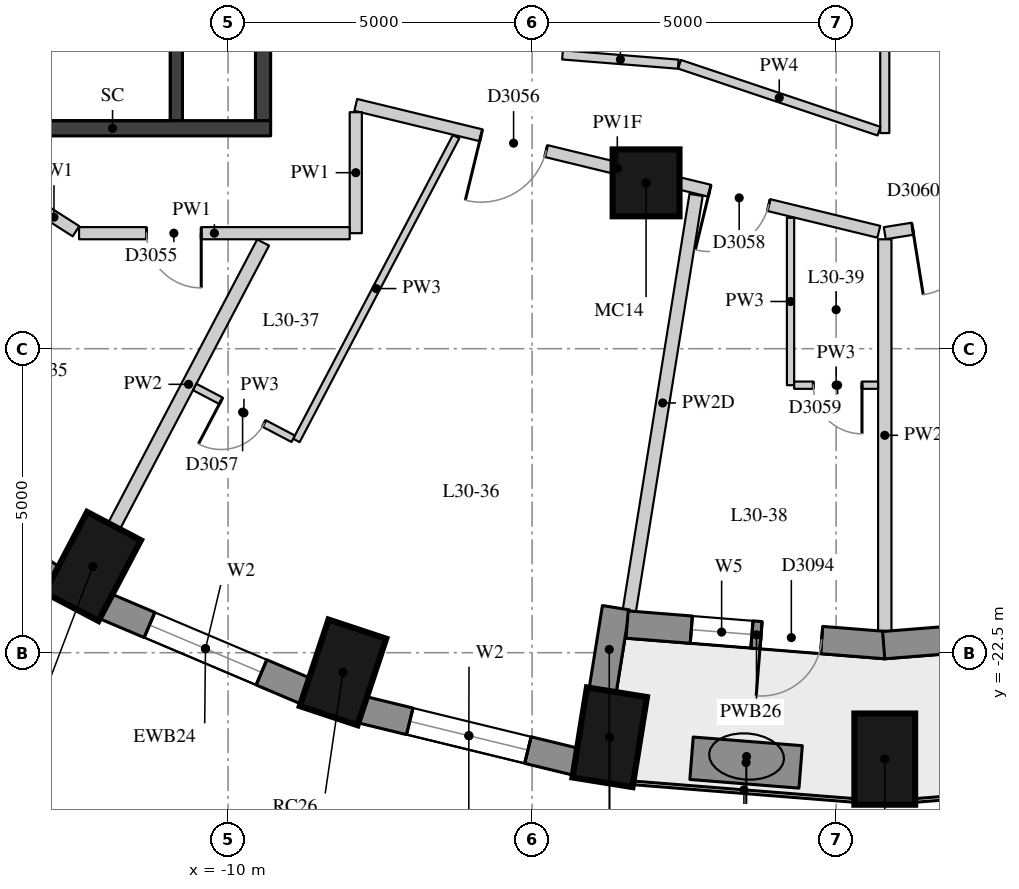
"""IFC4 building model, lengths in metres.
Left out: names, types, materials, properties, quantities, classifications, styles, units other than length and angle.
Written with IfcOpenShell. Run it as: python <this file> out.ifc"""

import sys

from ifc_helpers import new_model, si_unit, direction, frame, frame_2d, origin, origin_2d, place, context, subcontext, project, spatial, rectangle, extrude, element, fill, save


model = new_model("IFC4")
c1 = context("Model", 3, precision=1e-05, world=origin(), true_north=direction((0.0, 1.0)))
c2 = subcontext(c1, "Body", "Model", "MODEL_VIEW")
j1 = project(units=[si_unit("LENGTHUNIT", "METRE"), si_unit("PLANEANGLEUNIT", "RADIAN")], contexts=[c1])
p1 = place(None, origin())
s1 = spatial("IfcSite", under=j1, at=p1, CompositionType="ELEMENT")
p2 = place(p1, origin())
s2 = spatial("IfcBuilding", under=s1, at=p2, CompositionType="ELEMENT")
p3 = place(p2, frame((0.0, 0.0, 108.7)))
s3 = spatial("IfcBuildingStorey", under=s2, at=p3, CompositionType="ELEMENT", Elevation=108.7)
for number, where, z_axis, x_axis in (
    (1, (-12.225, -21.082, 0.0), (0.0, 0.0, 1.0), (-0.465, -0.885, 0.0)),
    (2, (-8.11, -22.824, 0.0), (0.0, 0.0, 1.0), (-0.315, -0.949, 0.0)),
    (3, (-3.724, -23.891, 0.0), (0.0, 0.0, 1.0), (-0.159, -0.987, 0.0)),
    (4, (0.8, -24.25, 0.0), (0.0, 0.0, 1.0), (0.0, -1.0, 0.0)),
):
    element("IfcColumn", number, at=place(p3, frame(where, z_axis=z_axis, x_axis=x_axis)), inside=s3, PredefinedType="COLUMN", context=c2, shape_type="SweptSolid", body=[
        extrude(rectangle(XDim=1.5, YDim=1.0, at=origin_2d()), origin(), (0.0, 0.0, 1.0), 3.3),
    ])
p4 = place(p3, frame((-3.126, -14.772, 0.0), z_axis=(0.0, 0.0, 1.0), x_axis=(1.0, 0.0, 0.0)))
e5 = element("IfcColumn", 5, at=p4, inside=s3, PredefinedType="COLUMN", context=c2, shape_type="SweptSolid", body=[
    extrude(rectangle(XDim=1.1, YDim=1.1, at=origin_2d()), origin(), (0.0, 0.0, 1.0), 3.3),
])
p5 = place(p3, frame((-15.856, -19.392, 0.0), z_axis=(0.0, 0.0, 1.0), x_axis=(0.843891947083, -0.53651317006, 0.0)))
e6 = element("IfcWall", 6, at=p5, inside=s3, PredefinedType="SOLIDWALL", context=c2, shape_type="SweptSolid", body=[
    extrude(rectangle(XDim=3.532, YDim=0.45, at=frame_2d((1.766, 0.0))), origin(), (0.0, 0.0, 1.0), 3.02),
])
p6 = place(p5, frame((0.766, 0.0, 0.4)))
e7 = element("IfcOpeningElement", 7, at=p6, cuts=e6, PredefinedType="OPENING", context=c2, shape_type="SweptSolid", body=[
    extrude(rectangle(XDim=2.0, YDim=1.75, at=frame_2d((1.0, 0.875))), frame((0.0, 0.235, 0.0), z_axis=(0.0, -1.0, 0.0), x_axis=(1.0, 0.0, 0.0)), (0.0, 0.0, 1.0), 0.47),
])
p7 = place(p3, frame((-12.025, -21.733, 0.0), z_axis=(0.0, 0.0, 1.0), x_axis=(0.920879975612, -0.389846213932, 0.0)))
e8 = element("IfcWall", 8, at=p7, inside=s3, PredefinedType="SOLIDWALL", context=c2, shape_type="SweptSolid", body=[
    extrude(rectangle(XDim=3.592, YDim=0.45, at=frame_2d((1.796, 0.0))), origin(), (0.0, 0.0, 1.0), 3.02),
])
p8 = place(p7, frame((0.796, 0.0, 0.4)))
e9 = element("IfcOpeningElement", 9, at=p8, cuts=e8, PredefinedType="OPENING", context=c2, shape_type="SweptSolid", body=[
    extrude(rectangle(XDim=2.0, YDim=1.75, at=frame_2d((1.0, 0.875))), frame((0.0, 0.235, 0.0), z_axis=(0.0, -1.0, 0.0), x_axis=(1.0, 0.0, 0.0)), (0.0, 0.0, 1.0), 0.47),
])
p9 = place(p3, frame((-7.807, -23.435, 0.0), z_axis=(0.0, 0.0, 1.0), x_axis=(0.971667603162, -0.236351579148, 0.0)))
e10 = element("IfcWall", 10, at=p9, inside=s3, PredefinedType="SOLIDWALL", context=c2, shape_type="SweptSolid", body=[
    extrude(rectangle(XDim=3.635, YDim=0.45, at=frame_2d((1.817, 0.0))), origin(), (0.0, 0.0, 1.0), 3.02),
])
p10 = place(p9, frame((0.817, 0.0, 0.4)))
e11 = element("IfcOpeningElement", 11, at=p10, cuts=e10, PredefinedType="OPENING", context=c2, shape_type="SweptSolid", body=[
    extrude(rectangle(XDim=2.0, YDim=1.75, at=frame_2d((1.0, 0.875))), frame((0.0, 0.235, 0.0), z_axis=(0.0, -1.0, 0.0), x_axis=(1.0, 0.0, 0.0)), (0.0, 0.0, 1.0), 0.47),
])
p11 = place(p3, frame((-3.841, -23.132, 0.0), z_axis=(0.0, 0.0, 1.0), x_axis=(0.158442643832, 0.987368182906, 0.0)))
e12 = element("IfcWall", 12, at=p11, inside=s3, PredefinedType="SOLIDWALL", context=c2, shape_type="SweptSolid", body=[
    extrude(rectangle(XDim=1.39, YDim=0.45, at=frame_2d((0.695, 0.0))), origin(), (0.0, 0.0, 1.0), 2.47),
])
p12 = place(p3, frame((-3.438, -22.037, 0.0), z_axis=(0.0, 0.0, 1.0), x_axis=(0.996844307919, -0.079381520332, 0.0)))
e13 = element("IfcWall", 13, at=p12, inside=s3, PredefinedType="SOLIDWALL", context=c2, shape_type="SweptSolid", body=[
    extrude(rectangle(XDim=4.269, YDim=0.45, at=frame_2d((2.134, 0.0))), origin(), (0.0, 0.0, 1.0), 3.02),
])
p13 = place(p12, frame((1.06, 0.0, 0.4)))
e14 = element("IfcOpeningElement", 14, at=p13, cuts=e13, PredefinedType="OPENING", context=c2, shape_type="SweptSolid", body=[
    extrude(rectangle(XDim=1.0, YDim=1.75, at=frame_2d((0.5, 0.875))), frame((0.0, 0.235, 0.0), z_axis=(0.0, -1.0, 0.0), x_axis=(1.0, 0.0, 0.0)), (0.0, 0.0, 1.0), 0.47),
])
p14 = place(p12, frame((2.209, 0.0, 0.0)))
e15 = element("IfcOpeningElement", 15, at=p14, cuts=e13, PredefinedType="OPENING", context=c2, shape_type="SweptSolid", body=[
    extrude(rectangle(XDim=1.0, YDim=2.15, at=frame_2d((0.5, 1.075))), frame((0.0, 0.235, 0.0), z_axis=(0.0, -1.0, 0.0), x_axis=(1.0, 0.0, 0.0)), (0.0, 0.0, 1.0), 0.47),
])
p15 = place(p3, frame((0.782, -22.376, 0.0), z_axis=(0.0, 0.0, 1.0), x_axis=(0.996843465986, 0.079392092303, 0.0)))
e16 = element("IfcWall", 16, at=p15, inside=s3, PredefinedType="SOLIDWALL", context=c2, shape_type="SweptSolid", body=[
    extrude(rectangle(XDim=4.287, YDim=0.45, at=frame_2d((2.143, 0.0))), origin(), (0.0, 0.0, 1.0), 3.02),
])
p16 = place(p15, frame((1.068, 0.0, 0.4)))
e17 = element("IfcOpeningElement", 17, at=p16, cuts=e16, PredefinedType="OPENING", context=c2, shape_type="SweptSolid", body=[
    extrude(rectangle(XDim=1.0, YDim=1.75, at=frame_2d((0.5, 0.875))), frame((0.0, 0.235, 0.0), z_axis=(0.0, -1.0, 0.0), x_axis=(1.0, 0.0, 0.0)), (0.0, 0.0, 1.0), 0.47),
])
p17 = place(p15, frame((2.219, 0.0, 0.0)))
e18 = element("IfcOpeningElement", 18, at=p17, cuts=e16, PredefinedType="OPENING", context=c2, shape_type="SweptSolid", body=[
    extrude(rectangle(XDim=1.0, YDim=2.15, at=frame_2d((0.5, 1.075))), frame((0.0, 0.235, 0.0), z_axis=(0.0, -1.0, 0.0), x_axis=(1.0, 0.0, 0.0)), (0.0, 0.0, 1.0), 0.47),
])
p18 = place(p3, frame((-2.378, -24.236, 0.0), z_axis=(0.0, 0.0, 1.0), x_axis=(0.996858257414, -0.079206152698, 0.0)))
e19 = element("IfcWall", 19, at=p18, inside=s3, PredefinedType="USERDEFINED", context=c2, shape_type="SweptSolid", body=[
    extrude(rectangle(XDim=1.8, YDim=0.7, at=frame_2d((0.9, 0.0))), origin(), (0.0, 0.0, 1.0), 0.75),
])
p19 = place(p3, frame((-10.85, -13.75, 0.0), z_axis=(0.0, 0.0, 1.0), x_axis=(0.0, 1.0, 0.0)))
e20 = element("IfcWall", 20, at=p19, inside=s3, PredefinedType="SHEAR", context=c2, shape_type="SweptSolid", body=[
    extrude(rectangle(XDim=6.0, YDim=0.2, at=frame_2d((3.0, 0.0))), origin(), (0.0, 0.0, 1.0), 3.02),
])
p20 = place(p19, frame((4.4, 0.0, 0.0)))
e21 = element("IfcOpeningElement", 21, at=p20, cuts=e20, PredefinedType="OPENING", context=c2, shape_type="SweptSolid", body=[
    extrude(rectangle(XDim=1.5, YDim=2.1, at=frame_2d((0.75, 1.05))), frame((0.0, 0.11, 0.0), z_axis=(0.0, -1.0, 0.0), x_axis=(1.0, 0.0, 0.0)), (0.0, 0.0, 1.0), 0.22),
])
p21 = place(p3, frame((-9.425, -13.75, -0.28), z_axis=(0.0, 0.0, 1.0), x_axis=(0.0, 1.0, 0.0)))
e22 = element("IfcWall", 22, at=p21, inside=s3, PredefinedType="SHEAR", context=c2, shape_type="SweptSolid", body=[
    extrude(rectangle(XDim=6.0, YDim=0.25, at=frame_2d((3.0, 0.0))), origin(), (0.0, 0.0, 1.0), 3.3),
])
p22 = place(p21, frame((2.4, 0.0, 0.28)))
e23 = element("IfcOpeningElement", 23, at=p22, cuts=e22, PredefinedType="OPENING", context=c2, shape_type="SweptSolid", body=[
    extrude(rectangle(XDim=1.5, YDim=2.1, at=frame_2d((0.75, 1.05))), frame((0.0, 0.135, 0.0), z_axis=(0.0, -1.0, 0.0), x_axis=(1.0, 0.0, 0.0)), (0.0, 0.0, 1.0), 0.27),
])
p23 = place(p3, frame((-14.5, -13.875, -0.28), z_axis=(0.0, 0.0, 1.0), x_axis=(1.0, 0.0, 0.0)))
e24 = element("IfcWall", 24, at=p23, inside=s3, PredefinedType="SHEAR", context=c2, shape_type="SweptSolid", body=[
    extrude(rectangle(XDim=5.2, YDim=0.25, at=frame_2d((2.6, 0.0))), origin(), (0.0, 0.0, 1.0), 3.3),
])
p24 = place(p3, frame((6.891, -14.625, 0.0), z_axis=(0.0, 0.0, 1.0), x_axis=(-0.987419134366, -0.158124802253, 0.0)))
e25 = element("IfcWall", 25, at=p24, inside=s3, PredefinedType="PARTITIONING", context=c2, shape_type="SweptSolid", body=[
    extrude(rectangle(XDim=6.168, YDim=0.2, at=frame_2d((3.084, 0.0))), origin(), (0.0, 0.0, 1.0), 2.42),
])
p25 = place(p24, frame((4.604, 0.0, 0.0)))
e26 = element("IfcOpeningElement", 26, at=p25, cuts=e25, PredefinedType="OPENING", context=c2, shape_type="SweptSolid", body=[
    extrude(rectangle(XDim=1.1, YDim=2.1, at=frame_2d((0.55, 1.05))), frame((0.0, 0.11, 0.0), z_axis=(0.0, -1.0, 0.0), x_axis=(1.0, 0.0, 0.0)), (0.0, 0.0, 1.0), 0.22),
])
p26 = place(p3, frame((0.702, -15.577, 0.0), z_axis=(0.0, 0.0, 1.0), x_axis=(-0.971804733873, 0.235787105715, 0.0)))
e27 = element("IfcWall", 27, at=p26, inside=s3, PredefinedType="PARTITIONING", context=c2, shape_type="SweptSolid", body=[
    extrude(rectangle(XDim=8.852, YDim=0.2, at=frame_2d((4.426, 0.0))), origin(), (0.0, 0.0, 1.0), 2.42),
])
p27 = place(p26, frame((5.631, 0.0, 0.0)))
e28 = element("IfcOpeningElement", 28, at=p27, cuts=e27, PredefinedType="OPENING", context=c2, shape_type="SweptSolid", body=[
    extrude(rectangle(XDim=1.1, YDim=2.1, at=frame_2d((0.55, 1.05))), frame((0.0, 0.11, 0.0), z_axis=(0.0, -1.0, 0.0), x_axis=(1.0, 0.0, 0.0)), (0.0, 0.0, 1.0), 0.22),
])
p28 = place(p26, frame((1.863, 0.0, 0.0)))
e29 = element("IfcOpeningElement", 29, at=p28, cuts=e27, PredefinedType="OPENING", context=c2, shape_type="SweptSolid", body=[
    extrude(rectangle(XDim=1.0, YDim=2.1, at=frame_2d((0.5, 1.05))), frame((0.0, 0.11, 0.0), z_axis=(0.0, -1.0, 0.0), x_axis=(1.0, 0.0, 0.0)), (0.0, 0.0, 1.0), 0.22),
])
p29 = place(p3, frame((-7.9, -13.61, 0.0), z_axis=(0.0, 0.0, 1.0), x_axis=(0.0, -1.0, 0.0)))
e30 = element("IfcWall", 30, at=p29, inside=s3, PredefinedType="PARTITIONING", context=c2, shape_type="SweptSolid", body=[
    extrude(rectangle(XDim=1.99, YDim=0.2, at=frame_2d((0.995, 0.0))), origin(), (0.0, 0.0, 1.0), 3.02),
])
p30 = place(p3, frame((-8.0, -15.6, 0.0), z_axis=(0.0, 0.0, 1.0), x_axis=(-1.0, 0.0, 0.0)))
e31 = element("IfcWall", 31, at=p30, inside=s3, PredefinedType="PARTITIONING", context=c2, shape_type="SweptSolid", body=[
    extrude(rectangle(XDim=4.451, YDim=0.2, at=frame_2d((2.226, 0.0))), origin(), (0.0, 0.0, 1.0), 3.02),
])
p31 = place(p30, frame((2.442, 0.0, 0.0)))
e32 = element("IfcOpeningElement", 32, at=p31, cuts=e31, PredefinedType="OPENING", context=c2, shape_type="SweptSolid", body=[
    extrude(rectangle(XDim=0.9, YDim=2.1, at=frame_2d((0.45, 1.05))), frame((0.0, 0.11, 0.0), z_axis=(0.0, -1.0, 0.0), x_axis=(1.0, 0.0, 0.0)), (0.0, 0.0, 1.0), 0.22),
])
p32 = place(p3, frame((-12.501, -15.568, 0.0), z_axis=(0.0, 0.0, 1.0), x_axis=(-0.843169167706, 0.537648355926, 0.0)))
e33 = element("IfcWall", 33, at=p32, inside=s3, PredefinedType="PARTITIONING", context=c2, shape_type="SweptSolid", body=[
    extrude(rectangle(XDim=0.858, YDim=0.2, at=frame_2d((0.429, 0.0))), origin(), (0.0, 0.0, 1.0), 3.02),
])
p33 = place(p3, frame((0.8, -9.23, 0.0), z_axis=(0.0, 0.0, 1.0), x_axis=(0.0, -1.0, 0.0)))
e34 = element("IfcWall", 34, at=p33, inside=s3, PredefinedType="PARTITIONING", context=c2, shape_type="SweptSolid", body=[
    extrude(rectangle(XDim=4.724, YDim=0.15, at=frame_2d((2.362, 0.0))), origin(), (0.0, 0.0, 1.0), 3.02),
])
p34 = place(p33, frame((1.912, 0.0, 0.0)))
e35 = element("IfcOpeningElement", 35, at=p34, cuts=e34, PredefinedType="OPENING", context=c2, shape_type="SweptSolid", body=[
    extrude(rectangle(XDim=0.9, YDim=2.1, at=frame_2d((0.45, 1.05))), frame((0.0, 0.085, 0.0), z_axis=(0.0, -1.0, 0.0), x_axis=(1.0, 0.0, 0.0)), (0.0, 0.0, 1.0), 0.17),
])
p35 = place(p3, frame((0.705, -13.922, 0.0), z_axis=(0.0, 0.0, 1.0), x_axis=(-0.948131483463, 0.317878420258, 0.0)))
e36 = element("IfcWall", 36, at=p35, inside=s3, PredefinedType="PARTITIONING", context=c2, shape_type="SweptSolid", body=[
    extrude(rectangle(XDim=3.46, YDim=0.15, at=frame_2d((1.73, 0.0))), origin(), (0.0, 0.0, 1.0), 3.02),
])
p36 = place(p3, frame((-2.596, -12.82, 0.0), z_axis=(0.0, 0.0, 1.0), x_axis=(-0.996815278536, 0.079745222283, 0.0)))
e37 = element("IfcWall", 37, at=p36, inside=s3, PredefinedType="PARTITIONING", context=c2, shape_type="SweptSolid", body=[
    extrude(rectangle(XDim=1.91, YDim=0.15, at=frame_2d((0.955, 0.0))), origin(), (0.0, 0.0, 1.0), 3.02),
])
p37 = place(p3, frame((-11.876, -20.418, 0.0), z_axis=(0.0, 0.0, 1.0), x_axis=(0.465320539057, 0.885142246157, 0.0)))
e38 = element("IfcWall", 38, at=p37, inside=s3, PredefinedType="PARTITIONING", context=c2, shape_type="SweptSolid", body=[
    extrude(rectangle(XDim=5.269, YDim=0.22, at=frame_2d((2.635, 0.0))), origin(), (0.0, 0.0, 1.0), 3.02),
])
p38 = place(p3, frame((-3.402, -21.814, 0.0), z_axis=(0.0, 0.0, 1.0), x_axis=(0.158512534522, 0.987356965033, 0.0)))
e39 = element("IfcWall", 39, at=p38, inside=s3, PredefinedType="PARTITIONING", context=c2, shape_type="SweptSolid", body=[
    extrude(rectangle(XDim=6.931, YDim=0.22, at=frame_2d((3.465, 0.0))), origin(), (0.0, 0.0, 1.0), 2.47),
])
p39 = place(p3, frame((0.8, -22.149, 0.0), z_axis=(0.0, 0.0, 1.0), x_axis=(0.0, 1.0, 0.0)))
e40 = element("IfcWall", 40, at=p39, inside=s3, PredefinedType="PARTITIONING", context=c2, shape_type="SweptSolid", body=[
    extrude(rectangle(XDim=6.448, YDim=0.22, at=frame_2d((3.224, 0.0))), origin(), (0.0, 0.0, 1.0), 2.47),
])
p40 = place(p3, frame((-6.25, -14.013, 0.0), z_axis=(0.0, 0.0, 1.0), x_axis=(-0.465288210927, -0.885159240347, 0.0)))
e41 = element("IfcWall", 41, at=p40, inside=s3, PredefinedType="PARTITIONING", context=c2, shape_type="SweptSolid", body=[
    extrude(rectangle(XDim=5.644, YDim=0.12, at=frame_2d((2.822, 0.0))), origin(), (0.0, 0.0, 1.0), 3.02),
])
p41 = place(p3, frame((-0.75, -15.347, 0.0), z_axis=(0.0, 0.0, 1.0), x_axis=(0.0, -1.0, 0.0)))
e42 = element("IfcWall", 42, at=p41, inside=s3, PredefinedType="PARTITIONING", context=c2, shape_type="SweptSolid", body=[
    extrude(rectangle(XDim=2.753, YDim=0.12, at=frame_2d((1.376, 0.0))), origin(), (0.0, 0.0, 1.0), 3.02),
])
p42 = place(p3, frame((-8.929, -18.981, 0.0), z_axis=(0.0, 0.0, 1.0), x_axis=(-0.885114946598, 0.465372465139, 0.0)))
e43 = element("IfcWall", 43, at=p42, inside=s3, PredefinedType="PARTITIONING", context=c2, shape_type="SweptSolid", body=[
    extrude(rectangle(XDim=1.83, YDim=0.12, at=frame_2d((0.915, 0.0))), origin(), (0.0, 0.0, 1.0), 3.02),
])
p43 = place(p42, frame((0.54, 0.0, 0.0)))
e44 = element("IfcOpeningElement", 44, at=p43, cuts=e43, PredefinedType="OPENING", context=c2, shape_type="SweptSolid", body=[
    extrude(rectangle(XDim=0.8, YDim=2.1, at=frame_2d((0.4, 1.05))), frame((0.0, 0.07, 0.0), z_axis=(0.0, -1.0, 0.0), x_axis=(1.0, 0.0, 0.0)), (0.0, 0.0, 1.0), 0.14),
])
p44 = place(p3, frame((-0.69, -18.1, 0.0), z_axis=(0.0, 0.0, 1.0), x_axis=(1.0, 0.0, 0.0)))
e45 = element("IfcWall", 45, at=p44, inside=s3, PredefinedType="PARTITIONING", context=c2, shape_type="SweptSolid", body=[
    extrude(rectangle(XDim=1.38, YDim=0.12, at=frame_2d((0.69, 0.0))), origin(), (0.0, 0.0, 1.0), 3.02),
])
p45 = place(p44, frame((0.315, 0.0, 0.0)))
e46 = element("IfcOpeningElement", 46, at=p45, cuts=e45, PredefinedType="OPENING", context=c2, shape_type="SweptSolid", body=[
    extrude(rectangle(XDim=0.8, YDim=2.1, at=frame_2d((0.4, 1.05))), frame((0.0, 0.07, 0.0), z_axis=(0.0, -1.0, 0.0), x_axis=(1.0, 0.0, 0.0)), (0.0, 0.0, 1.0), 0.14),
])
p46 = place(p8, origin())
e47 = element("IfcWindow", 47, at=p46, inside=s3, PartitioningType="SINGLE_PANEL", PredefinedType="WINDOW", context=c2, shape_type="SweptSolid", body=[
    extrude(rectangle(XDim=2.0, YDim=1.75, at=frame_2d((1.0, 0.875))), frame((0.0, 0.035, 0.0), z_axis=(0.0, -1.0, 0.0), x_axis=(1.0, 0.0, 0.0)), (0.0, 0.0, 1.0), 0.06),
])
fill(e9, e47)
p47 = place(p10, origin())
e48 = element("IfcWindow", 48, at=p47, inside=s3, PartitioningType="SINGLE_PANEL", PredefinedType="WINDOW", context=c2, shape_type="SweptSolid", body=[
    extrude(rectangle(XDim=2.0, YDim=1.75, at=frame_2d((1.0, 0.875))), frame((0.0, 0.035, 0.0), z_axis=(0.0, -1.0, 0.0), x_axis=(1.0, 0.0, 0.0)), (0.0, 0.0, 1.0), 0.06),
])
fill(e11, e48)
p48 = place(p13, origin())
e49 = element("IfcWindow", 49, at=p48, inside=s3, PartitioningType="SINGLE_PANEL", PredefinedType="WINDOW", context=c2, shape_type="SweptSolid", body=[
    extrude(rectangle(XDim=1.0, YDim=1.75, at=frame_2d((0.5, 0.875))), frame((0.0, 0.035, 0.0), z_axis=(0.0, -1.0, 0.0), x_axis=(1.0, 0.0, 0.0)), (0.0, 0.0, 1.0), 0.06),
])
fill(e14, e49)
p49 = place(p14, frame((1.0, 0.0, 0.0), z_axis=(0.0, 0.0, 1.0), x_axis=(-1.0, 0.0, 0.0)))
e50 = element("IfcDoor", 50, at=p49, inside=s3, OperationType="SINGLE_SWING_RIGHT", PredefinedType="DOOR", context=c2, shape_type="SweptSolid", body=[
    extrude(rectangle(XDim=1.0, YDim=2.15, at=frame_2d((0.5, 1.075))), frame((0.0, 0.075, 0.0), z_axis=(0.0, -1.0, 0.0), x_axis=(1.0, 0.0, 0.0)), (0.0, 0.0, 1.0), 0.05),
])
fill(e15, e50)
p50 = place(p31, origin())
e51 = element("IfcDoor", 51, at=p50, inside=s3, OperationType="SINGLE_SWING_LEFT", PredefinedType="DOOR", context=c2, shape_type="SweptSolid", body=[
    extrude(rectangle(XDim=0.9, YDim=2.1, at=frame_2d((0.45, 1.05))), frame((0.0, 0.025, 0.0), z_axis=(0.0, -1.0, 0.0), x_axis=(1.0, 0.0, 0.0)), (0.0, 0.0, 1.0), 0.05),
])
fill(e32, e51)
p51 = place(p27, origin())
e52 = element("IfcDoor", 52, at=p51, inside=s3, OperationType="SINGLE_SWING_RIGHT", PredefinedType="DOOR", context=c2, shape_type="SweptSolid", body=[
    extrude(rectangle(XDim=1.1, YDim=2.1, at=frame_2d((0.55, 1.05))), frame((0.0, 0.025, 0.0), z_axis=(0.0, -1.0, 0.0), x_axis=(1.0, 0.0, 0.0)), (0.0, 0.0, 1.0), 0.05),
])
fill(e28, e52)
p52 = place(p43, origin())
e53 = element("IfcDoor", 53, at=p52, inside=s3, OperationType="SINGLE_SWING_RIGHT", PredefinedType="DOOR", context=c2, shape_type="SweptSolid", body=[
    extrude(rectangle(XDim=0.8, YDim=2.1, at=frame_2d((0.4, 1.05))), frame((0.0, 0.025, 0.0), z_axis=(0.0, -1.0, 0.0), x_axis=(1.0, 0.0, 0.0)), (0.0, 0.0, 1.0), 0.05),
])
fill(e44, e53)
p53 = place(p28, origin())
e54 = element("IfcDoor", 54, at=p53, inside=s3, OperationType="SINGLE_SWING_RIGHT", PredefinedType="DOOR", context=c2, shape_type="SweptSolid", body=[
    extrude(rectangle(XDim=1.0, YDim=2.1, at=frame_2d((0.5, 1.05))), frame((0.0, 0.025, 0.0), z_axis=(0.0, -1.0, 0.0), x_axis=(1.0, 0.0, 0.0)), (0.0, 0.0, 1.0), 0.05),
])
fill(e29, e54)
p54 = place(p45, origin())
e55 = element("IfcDoor", 55, at=p54, inside=s3, OperationType="SINGLE_SWING_LEFT", PredefinedType="DOOR", context=c2, shape_type="SweptSolid", body=[
    extrude(rectangle(XDim=0.8, YDim=2.1, at=frame_2d((0.4, 1.05))), frame((0.0, 0.025, 0.0), z_axis=(0.0, -1.0, 0.0), x_axis=(1.0, 0.0, 0.0)), (0.0, 0.0, 1.0), 0.05),
])
fill(e46, e55)
p55 = place(p25, origin())
e56 = element("IfcDoor", 56, at=p55, inside=s3, OperationType="SINGLE_SWING_RIGHT", PredefinedType="DOOR", context=c2, shape_type="SweptSolid", body=[
    extrude(rectangle(XDim=1.1, YDim=2.1, at=frame_2d((0.55, 1.05))), frame((0.0, 0.025, 0.0), z_axis=(0.0, -1.0, 0.0), x_axis=(1.0, 0.0, 0.0)), (0.0, 0.0, 1.0), 0.05),
])
fill(e26, e56)
save(model, sys.argv[1])
